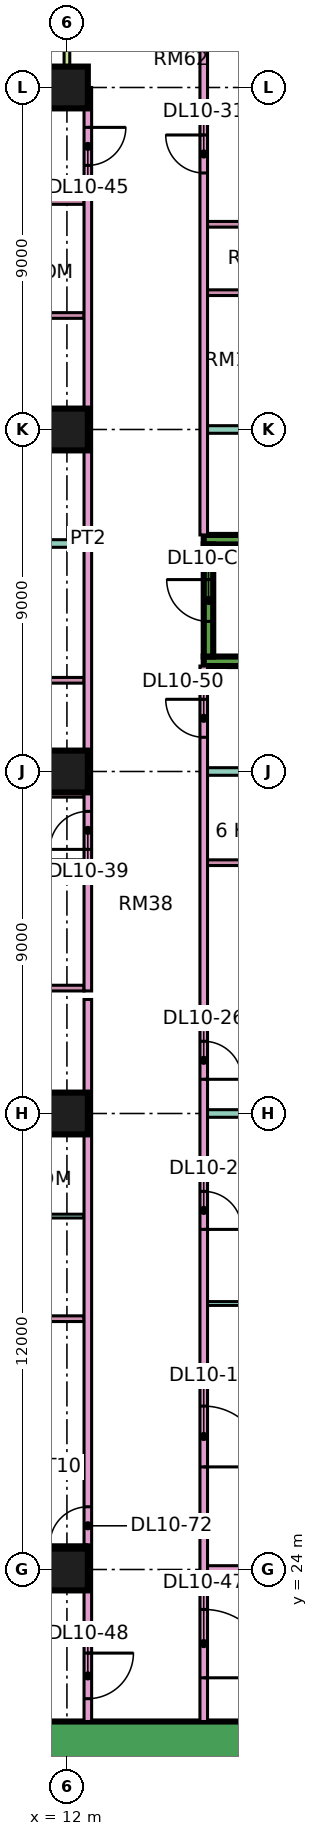
"""IFC4 building model, lengths in metres.
Left out: names, types, materials, properties, quantities, classifications, styles, units other than length and angle.
Written with IfcOpenShell. Run it as: python <this file> out.ifc"""

import sys

from ifc_helpers import new_model, si_unit, direction, frame, frame_2d, origin, origin_2d, place, context, subcontext, project, spatial, rectangle, extrude, element, fill, save


model = new_model("IFC4")
c1 = context("Model", 3, precision=1e-05, world=origin(), true_north=direction((0.0, 1.0)))
c2 = subcontext(c1, "Body", "Model", "MODEL_VIEW")
j1 = project(units=[si_unit("LENGTHUNIT", "METRE"), si_unit("PLANEANGLEUNIT", "RADIAN")], contexts=[c1])
p1 = place(None, origin())
s1 = spatial("IfcSite", under=j1, at=p1, CompositionType="ELEMENT")
p2 = place(p1, origin())
s2 = spatial("IfcBuilding", under=s1, at=p2, CompositionType="ELEMENT")
p3 = place(p2, frame((0.0, 0.0, 52.65)))
s3 = spatial("IfcBuildingStorey", under=s2, at=p3, CompositionType="ELEMENT", Elevation=52.65)
for number, where, z_axis, x_axis in (
    (1, (12.0, 24.0, 0.0), (0.0, 0.0, 1.0), (1.0, 0.0, 0.0)),
    (2, (12.0, 36.0, 0.0), (0.0, 0.0, 1.0), (1.0, 0.0, 0.0)),
    (3, (12.0, 45.0, 0.0), (0.0, 0.0, 1.0), (1.0, 0.0, 0.0)),
    (4, (12.0, 54.0, 0.0), (0.0, 0.0, 1.0), (1.0, 0.0, 0.0)),
    (5, (12.0, 63.0, 0.0), (0.0, 0.0, 1.0), (1.0, 0.0, 0.0)),
):
    element("IfcColumn", number, at=place(p3, frame(where, z_axis=z_axis, x_axis=x_axis)), inside=s3, PredefinedType="COLUMN", context=c2, shape_type="SweptSolid", body=[
        extrude(rectangle(XDim=1.1, YDim=1.1, at=origin_2d()), origin(), (0.0, 0.0, 1.0), 3.75),
    ])
p4 = place(p3, frame((9.0, 19.45, 0.0), z_axis=(0.0, 0.0, 1.0), x_axis=(1.0, 0.0, 0.0)))
e6 = element("IfcWall", 6, at=p4, inside=s3, PredefinedType="SHEAR", context=c2, shape_type="SweptSolid", body=[
    extrude(rectangle(XDim=25.0, YDim=1.1, at=frame_2d((12.5, 0.0))), origin(), (0.0, 0.0, 1.0), 3.75),
])
p5 = place(p4, frame((19.1, 0.0, 0.0)))
e7 = element("IfcOpeningElement", 7, at=p5, cuts=e6, PredefinedType="OPENING", context=c2, shape_type="SweptSolid", body=[
    extrude(rectangle(XDim=1.8, YDim=2.4, at=frame_2d((0.9, 1.2))), frame((0.0, 0.56, 0.0), z_axis=(0.0, -1.0, 0.0), x_axis=(1.0, 0.0, 0.0)), (0.0, 0.0, 1.0), 1.12),
])
for number, where, z_axis, x_axis in (
    (8, (15.6, 47.9, 0.0), (0.0, 0.0, 1.0), (1.0, 0.0, 0.0)),
    (9, (15.6, 51.1, 0.0), (0.0, 0.0, 1.0), (1.0, 0.0, 0.0)),
):
    element("IfcWall", number, at=place(p3, frame(where, z_axis=z_axis, x_axis=x_axis)), inside=s3, PredefinedType="SHEAR", context=c2, shape_type="SweptSolid", body=[
        extrude(rectangle(XDim=7.0, YDim=0.25, at=frame_2d((3.5, 0.0))), origin(), (0.0, 0.0, 1.0), 3.75),
    ])
p6 = place(p3, frame((15.725, 48.025, 0.0), z_axis=(0.0, 0.0, 1.0), x_axis=(0.0, 1.0, 0.0)))
e10 = element("IfcWall", 10, at=p6, inside=s3, PredefinedType="SHEAR", context=c2, shape_type="SweptSolid", body=[
    extrude(rectangle(XDim=2.95, YDim=0.25, at=frame_2d((1.475, 0.0))), origin(), (0.0, 0.0, 1.0), 3.75),
])
p7 = place(p6, frame((0.925, 0.0, 0.0)))
e11 = element("IfcOpeningElement", 11, at=p7, cuts=e10, PredefinedType="OPENING", context=c2, shape_type="SweptSolid", body=[
    extrude(rectangle(XDim=1.1, YDim=2.2, at=frame_2d((0.55, 1.1))), frame((0.0, 0.135, 0.0), z_axis=(0.0, -1.0, 0.0), x_axis=(1.0, 0.0, 0.0)), (0.0, 0.0, 1.0), 0.27),
])
p8 = place(p3, frame((11.925, 63.0, 0.0), z_axis=(0.0, 0.0, 1.0), x_axis=(-1.0, 0.0, 0.0)))
e12 = element("IfcWall", 12, at=p8, inside=s3, PredefinedType="SOLIDWALL", context=c2, shape_type="SweptSolid", body=[
    extrude(rectangle(XDim=10.35, YDim=0.15, at=frame_2d((5.175, 0.0))), origin(), (0.0, 0.0, 1.0), 3.35),
])
p9 = place(p8, frame((1.775, 0.0, 0.0)))
e13 = element("IfcOpeningElement", 13, at=p9, cuts=e12, PredefinedType="OPENING", context=c2, shape_type="SweptSolid", body=[
    extrude(rectangle(XDim=1.8, YDim=2.4, at=frame_2d((0.9, 1.2))), frame((0.0, 0.085, 0.0), z_axis=(0.0, -1.0, 0.0), x_axis=(1.0, 0.0, 0.0)), (0.0, 0.0, 1.0), 0.17),
])
p10 = place(p8, frame((6.062, 0.0, 0.45)))
e14 = element("IfcOpeningElement", 14, at=p10, cuts=e12, PredefinedType="OPENING", context=c2, shape_type="SweptSolid", body=[
    extrude(rectangle(XDim=3.0, YDim=2.4, at=frame_2d((1.5, 1.2))), frame((0.0, 0.085, 0.0), z_axis=(0.0, -1.0, 0.0), x_axis=(1.0, 0.0, 0.0)), (0.0, 0.0, 1.0), 0.17),
])
p11 = place(p3, frame((12.0, 64.5, 0.0), z_axis=(0.0, 0.0, 1.0), x_axis=(0.0, -1.0, 0.0)))
e15 = element("IfcWall", 15, at=p11, inside=s3, PredefinedType="SOLIDWALL", context=c2, shape_type="SweptSolid", body=[
    extrude(rectangle(XDim=1.5, YDim=0.15, at=frame_2d((0.75, 0.0))), origin(), (0.0, 0.0, 1.0), 3.35),
])
p12 = place(p3, frame((-1.35, 22.4, 0.0), z_axis=(0.0, 0.0, 1.0), x_axis=(1.0, 0.0, 0.0)))
e16 = element("IfcWall", 16, at=p12, inside=s3, PredefinedType="PARTITIONING", context=c2, shape_type="SweptSolid", body=[
    extrude(rectangle(XDim=13.8, YDim=0.2, at=frame_2d((6.9, 0.0))), origin(), (0.0, 0.0, 1.0), 3.35),
])
p13 = place(p3, frame((0.0, 36.0, 0.0), z_axis=(0.0, 0.0, 1.0), x_axis=(1.0, 0.0, 0.0)))
e17 = element("IfcWall", 17, at=p13, inside=s3, PredefinedType="PARTITIONING", context=c2, shape_type="SweptSolid", body=[
    extrude(rectangle(XDim=12.45, YDim=0.2, at=frame_2d((6.225, 0.0))), origin(), (0.0, 0.0, 1.0), 3.35),
])
p14 = place(p3, frame((0.074, 51.0, 0.0), z_axis=(0.0, 0.0, 1.0), x_axis=(1.0, 0.0, 0.0)))
e18 = element("IfcWall", 18, at=p14, inside=s3, PredefinedType="PARTITIONING", context=c2, shape_type="SweptSolid", body=[
    extrude(rectangle(XDim=12.376, YDim=0.2, at=frame_2d((6.188, 0.0))), origin(), (0.0, 0.0, 1.0), 3.35),
])
p15 = place(p3, frame((7.075, 39.3, 0.0), z_axis=(0.0, 0.0, 1.0), x_axis=(1.0, 0.0, 0.0)))
e19 = element("IfcWall", 19, at=p15, inside=s3, PredefinedType="PARTITIONING", context=c2, shape_type="SweptSolid", body=[
    extrude(rectangle(XDim=5.375, YDim=0.15, at=frame_2d((2.688, 0.0))), origin(), (0.0, 0.0, 1.0), 3.35),
])
p16 = place(p3, frame((7.075, 42.6, 0.0), z_axis=(0.0, 0.0, 1.0), x_axis=(1.0, 0.0, 0.0)))
e20 = element("IfcWall", 20, at=p16, inside=s3, PredefinedType="PARTITIONING", context=c2, shape_type="SweptSolid", body=[
    extrude(rectangle(XDim=5.375, YDim=0.15, at=frame_2d((2.688, 0.0))), origin(), (0.0, 0.0, 1.0), 3.35),
])
p17 = place(p16, frame((2.425, 0.0, 0.0)))
e21 = element("IfcOpeningElement", 21, at=p17, cuts=e20, PredefinedType="OPENING", context=c2, shape_type="SweptSolid", body=[
    extrude(rectangle(XDim=0.8, YDim=2.1, at=frame_2d((0.4, 1.05))), frame((0.0, 0.085, 0.0), z_axis=(0.0, -1.0, 0.0), x_axis=(1.0, 0.0, 0.0)), (0.0, 0.0, 1.0), 0.17),
])
for number, where, z_axis, x_axis in (
    (22, (7.225, 44.4, 0.0), (0.0, 0.0, 1.0), (1.0, 0.0, 0.0)),
    (23, (7.225, 47.4, 0.0), (0.0, 0.0, 1.0), (1.0, 0.0, 0.0)),
):
    element("IfcWall", number, at=place(p3, frame(where, z_axis=z_axis, x_axis=x_axis)), inside=s3, PredefinedType="PARTITIONING", context=c2, shape_type="SweptSolid", body=[
        extrude(rectangle(XDim=5.225, YDim=0.15, at=frame_2d((2.612, 0.0))), origin(), (0.0, 0.0, 1.0), 3.35),
    ])
p18 = place(p3, frame((7.825, 26.7, 0.0), z_axis=(0.0, 0.0, 1.0), x_axis=(1.0, 0.0, 0.0)))
e24 = element("IfcWall", 24, at=p18, inside=s3, PredefinedType="PARTITIONING", context=c2, shape_type="SweptSolid", body=[
    extrude(rectangle(XDim=4.625, YDim=0.15, at=frame_2d((2.312, 0.0))), origin(), (0.0, 0.0, 1.0), 3.35),
])
p19 = place(p18, frame((1.975, 0.0, 0.0)))
e25 = element("IfcOpeningElement", 25, at=p19, cuts=e24, PredefinedType="OPENING", context=c2, shape_type="SweptSolid", body=[
    extrude(rectangle(XDim=0.8, YDim=2.1, at=frame_2d((0.4, 1.05))), frame((0.0, 0.085, 0.0), z_axis=(0.0, -1.0, 0.0), x_axis=(1.0, 0.0, 0.0)), (0.0, 0.0, 1.0), 0.17),
])
p20 = place(p3, frame((7.825, 30.6, 0.0), z_axis=(0.0, 0.0, 1.0), x_axis=(1.0, 0.0, 0.0)))
e26 = element("IfcWall", 26, at=p20, inside=s3, PredefinedType="PARTITIONING", context=c2, shape_type="SweptSolid", body=[
    extrude(rectangle(XDim=4.625, YDim=0.15, at=frame_2d((2.312, 0.0))), origin(), (0.0, 0.0, 1.0), 3.35),
])
p21 = place(p3, frame((7.825, 33.3, 0.0), z_axis=(0.0, 0.0, 1.0), x_axis=(1.0, 0.0, 0.0)))
e27 = element("IfcWall", 27, at=p21, inside=s3, PredefinedType="PARTITIONING", context=c2, shape_type="SweptSolid", body=[
    extrude(rectangle(XDim=4.625, YDim=0.1, at=frame_2d((2.312, 0.0))), origin(), (0.0, 0.0, 1.0), 3.35),
])
for number, where, z_axis, x_axis in (
    (28, (8.425, 57.0, 0.0), (0.0, 0.0, 1.0), (1.0, 0.0, 0.0)),
    (29, (8.425, 60.0, 0.0), (0.0, 0.0, 1.0), (1.0, 0.0, 0.0)),
):
    element("IfcWall", number, at=place(p3, frame(where, z_axis=z_axis, x_axis=x_axis)), inside=s3, PredefinedType="PARTITIONING", context=c2, shape_type="SweptSolid", body=[
        extrude(rectangle(XDim=4.025, YDim=0.15, at=frame_2d((2.012, 0.0))), origin(), (0.0, 0.0, 1.0), 3.35),
    ])
p22 = place(p3, frame((12.55, 20.0, 0.0), z_axis=(0.0, 0.0, 1.0), x_axis=(0.0, 1.0, 0.0)))
e30 = element("IfcWall", 30, at=p22, inside=s3, PredefinedType="PARTITIONING", context=c2, shape_type="SweptSolid", body=[
    extrude(rectangle(XDim=19.0, YDim=0.2, at=frame_2d((9.5, 0.0))), origin(), (0.0, 0.0, 1.0), 3.35),
])
p23 = place(p22, frame((0.6, 0.0, 0.0)))
e31 = element("IfcOpeningElement", 31, at=p23, cuts=e30, PredefinedType="OPENING", context=c2, shape_type="SweptSolid", body=[
    extrude(rectangle(XDim=1.2, YDim=2.1, at=frame_2d((0.6, 1.05))), frame((0.0, 0.11, 0.0), z_axis=(0.0, -1.0, 0.0), x_axis=(1.0, 0.0, 0.0)), (0.0, 0.0, 1.0), 0.22),
])
p24 = place(p22, frame((4.65, 0.0, 0.0)))
e32 = element("IfcOpeningElement", 32, at=p24, cuts=e30, PredefinedType="OPENING", context=c2, shape_type="SweptSolid", body=[
    extrude(rectangle(XDim=1.0, YDim=2.1, at=frame_2d((0.5, 1.05))), frame((0.0, 0.11, 0.0), z_axis=(0.0, -1.0, 0.0), x_axis=(1.0, 0.0, 0.0)), (0.0, 0.0, 1.0), 0.22),
])
p25 = place(p3, frame((12.55, 39.225, 0.0), z_axis=(0.0, 0.0, 1.0), x_axis=(0.0, 1.0, 0.0)))
e33 = element("IfcWall", 33, at=p25, inside=s3, PredefinedType="PARTITIONING", context=c2, shape_type="SweptSolid", body=[
    extrude(rectangle(XDim=23.775, YDim=0.2, at=frame_2d((11.887, 0.0))), origin(), (0.0, 0.0, 1.0), 3.35),
])
p26 = place(p25, frame((3.725, 0.0, 0.0)))
e34 = element("IfcOpeningElement", 34, at=p26, cuts=e33, PredefinedType="OPENING", context=c2, shape_type="SweptSolid", body=[
    extrude(rectangle(XDim=1.0, YDim=2.1, at=frame_2d((0.5, 1.05))), frame((0.0, 0.11, 0.0), z_axis=(0.0, -1.0, 0.0), x_axis=(1.0, 0.0, 0.0)), (0.0, 0.0, 1.0), 0.22),
])
p27 = place(p25, frame((21.725, 0.0, 0.0)))
e35 = element("IfcOpeningElement", 35, at=p27, cuts=e33, PredefinedType="OPENING", context=c2, shape_type="SweptSolid", body=[
    extrude(rectangle(XDim=1.0, YDim=2.1, at=frame_2d((0.5, 1.05))), frame((0.0, 0.11, 0.0), z_axis=(0.0, -1.0, 0.0), x_axis=(1.0, 0.0, 0.0)), (0.0, 0.0, 1.0), 0.22),
])
p28 = place(p3, frame((15.6, 20.0, 0.0), z_axis=(0.0, 0.0, 1.0), x_axis=(0.0, 1.0, 0.0)))
e36 = element("IfcWall", 36, at=p28, inside=s3, PredefinedType="PARTITIONING", context=c2, shape_type="SweptSolid", body=[
    extrude(rectangle(XDim=27.775, YDim=0.2, at=frame_2d((13.887, 0.0))), origin(), (0.0, 0.0, 1.0), 3.35),
])
p29 = place(p28, frame((6.7, 0.0, 0.0)))
e37 = element("IfcOpeningElement", 37, at=p29, cuts=e36, PredefinedType="OPENING", context=c2, shape_type="SweptSolid", body=[
    extrude(rectangle(XDim=1.6, YDim=2.1, at=frame_2d((0.8, 1.05))), frame((0.0, 0.11, 0.0), z_axis=(0.0, -1.0, 0.0), x_axis=(1.0, 0.0, 0.0)), (0.0, 0.0, 1.0), 0.22),
])
p30 = place(p28, frame((12.95, 0.0, 0.0)))
e38 = element("IfcOpeningElement", 38, at=p30, cuts=e36, PredefinedType="OPENING", context=c2, shape_type="SweptSolid", body=[
    extrude(rectangle(XDim=1.0, YDim=2.1, at=frame_2d((0.5, 1.05))), frame((0.0, 0.11, 0.0), z_axis=(0.0, -1.0, 0.0), x_axis=(1.0, 0.0, 0.0)), (0.0, 0.0, 1.0), 0.22),
])
p31 = place(p28, frame((16.9, 0.0, 0.0)))
e39 = element("IfcOpeningElement", 39, at=p31, cuts=e36, PredefinedType="OPENING", context=c2, shape_type="SweptSolid", body=[
    extrude(rectangle(XDim=1.0, YDim=2.1, at=frame_2d((0.5, 1.05))), frame((0.0, 0.11, 0.0), z_axis=(0.0, -1.0, 0.0), x_axis=(1.0, 0.0, 0.0)), (0.0, 0.0, 1.0), 0.22),
])
p32 = place(p28, frame((1.15, 0.0, 0.0)))
e40 = element("IfcOpeningElement", 40, at=p32, cuts=e36, PredefinedType="OPENING", context=c2, shape_type="SweptSolid", body=[
    extrude(rectangle(XDim=1.8, YDim=2.1, at=frame_2d((0.9, 1.05))), frame((0.0, 0.11, 0.0), z_axis=(0.0, -1.0, 0.0), x_axis=(1.0, 0.0, 0.0)), (0.0, 0.0, 1.0), 0.22),
])
p33 = place(p28, frame((25.9, 0.0, 0.0)))
e41 = element("IfcOpeningElement", 41, at=p33, cuts=e36, PredefinedType="OPENING", context=c2, shape_type="SweptSolid", body=[
    extrude(rectangle(XDim=1.0, YDim=2.1, at=frame_2d((0.5, 1.05))), frame((0.0, 0.11, 0.0), z_axis=(0.0, -1.0, 0.0), x_axis=(1.0, 0.0, 0.0)), (0.0, 0.0, 1.0), 0.22),
])
p34 = place(p3, frame((15.6, 51.225, 0.0), z_axis=(0.0, 0.0, 1.0), x_axis=(0.0, 1.0, 0.0)))
e42 = element("IfcWall", 42, at=p34, inside=s3, PredefinedType="PARTITIONING", context=c2, shape_type="SweptSolid", body=[
    extrude(rectangle(XDim=13.125, YDim=0.2, at=frame_2d((6.562, 0.0))), origin(), (0.0, 0.0, 1.0), 3.35),
])
p35 = place(p34, frame((9.525, 0.0, 0.0)))
e43 = element("IfcOpeningElement", 43, at=p35, cuts=e42, PredefinedType="OPENING", context=c2, shape_type="SweptSolid", body=[
    extrude(rectangle(XDim=1.0, YDim=2.1, at=frame_2d((0.5, 1.05))), frame((0.0, 0.11, 0.0), z_axis=(0.0, -1.0, 0.0), x_axis=(1.0, 0.0, 0.0)), (0.0, 0.0, 1.0), 0.22),
])
p36 = place(p3, frame((15.7, 24.0, 0.0), z_axis=(0.0, 0.0, 1.0), x_axis=(1.0, 0.0, 0.0)))
e44 = element("IfcWall", 44, at=p36, inside=s3, PredefinedType="PARTITIONING", context=c2, shape_type="SweptSolid", body=[
    extrude(rectangle(XDim=5.8, YDim=0.2, at=frame_2d((2.9, 0.0))), origin(), (0.0, 0.0, 1.0), 3.35),
])
p37 = place(p3, frame((15.7, 31.0, 0.0), z_axis=(0.0, 0.0, 1.0), x_axis=(1.0, 0.0, 0.0)))
e45 = element("IfcWall", 45, at=p37, inside=s3, PredefinedType="PARTITIONING", context=c2, shape_type="SweptSolid", body=[
    extrude(rectangle(XDim=5.8, YDim=0.1, at=frame_2d((2.9, 0.0))), origin(), (0.0, 0.0, 1.0), 3.35),
])
p38 = place(p3, frame((15.7, 36.0, 0.0), z_axis=(0.0, 0.0, 1.0), x_axis=(1.0, 0.0, 0.0)))
e46 = element("IfcWall", 46, at=p38, inside=s3, PredefinedType="PARTITIONING", context=c2, shape_type="SweptSolid", body=[
    extrude(rectangle(XDim=8.3, YDim=0.2, at=frame_2d((4.15, 0.0))), origin(), (0.0, 0.0, 1.0), 3.35),
])
for number, where, z_axis, x_axis in (
    (47, (15.7, 38.7, 0.0), (0.0, 0.0, 1.0), (1.0, 0.0, 0.0)),
    (48, (15.7, 42.6, 0.0), (0.0, 0.0, 1.0), (1.0, 0.0, 0.0)),
):
    element("IfcWall", number, at=place(p3, frame(where, z_axis=z_axis, x_axis=x_axis)), inside=s3, PredefinedType="PARTITIONING", context=c2, shape_type="SweptSolid", body=[
        extrude(rectangle(XDim=3.125, YDim=0.15, at=frame_2d((1.562, 0.0))), origin(), (0.0, 0.0, 1.0), 3.35),
    ])
p39 = place(p3, frame((15.7, 45.0, 0.0), z_axis=(0.0, 0.0, 1.0), x_axis=(1.0, 0.0, 0.0)))
e49 = element("IfcWall", 49, at=p39, inside=s3, PredefinedType="PARTITIONING", context=c2, shape_type="SweptSolid", body=[
    extrude(rectangle(XDim=8.3, YDim=0.2, at=frame_2d((4.15, 0.0))), origin(), (0.0, 0.0, 1.0), 3.35),
])
p40 = place(p3, frame((15.7, 54.0, 0.0), z_axis=(0.0, 0.0, 1.0), x_axis=(1.0, 0.0, 0.0)))
e50 = element("IfcWall", 50, at=p40, inside=s3, PredefinedType="PARTITIONING", context=c2, shape_type="SweptSolid", body=[
    extrude(rectangle(XDim=8.226, YDim=0.2, at=frame_2d((4.113, 0.0))), origin(), (0.0, 0.0, 1.0), 3.35),
])
for number, where, z_axis, x_axis in (
    (51, (15.7, 57.6, 0.0), (0.0, 0.0, 1.0), (1.0, 0.0, 0.0)),
    (52, (15.7, 59.4, 0.0), (0.0, 0.0, 1.0), (1.0, 0.0, 0.0)),
):
    element("IfcWall", number, at=place(p3, frame(where, z_axis=z_axis, x_axis=x_axis)), inside=s3, PredefinedType="PARTITIONING", context=c2, shape_type="SweptSolid", body=[
        extrude(rectangle(XDim=2.525, YDim=0.15, at=frame_2d((1.263, 0.0))), origin(), (0.0, 0.0, 1.0), 3.35),
    ])
p41 = place(p7, frame((1.1, 0.0, 0.0), z_axis=(0.0, 0.0, 1.0), x_axis=(-1.0, 0.0, 0.0)))
e53 = element("IfcDoor", 53, at=p41, inside=s3, OperationType="SINGLE_SWING_RIGHT", PredefinedType="DOOR", context=c2, shape_type="SweptSolid", body=[
    extrude(rectangle(XDim=1.1, YDim=2.2, at=frame_2d((0.55, 1.1))), frame((0.0, 0.025, 0.0), z_axis=(0.0, -1.0, 0.0), x_axis=(1.0, 0.0, 0.0)), (0.0, 0.0, 1.0), 0.05),
])
fill(e11, e53)
p42 = place(p29, frame((1.6, 0.0, 0.0), z_axis=(0.0, 0.0, 1.0), x_axis=(-1.0, 0.0, 0.0)))
e54 = element("IfcDoor", 54, at=p42, inside=s3, OperationType="DOUBLE_DOOR_SINGLE_SWING", PredefinedType="DOOR", context=c2, shape_type="SweptSolid", body=[
    extrude(rectangle(XDim=1.6, YDim=2.1, at=frame_2d((0.8, 1.05))), frame((0.0, 0.025, 0.0), z_axis=(0.0, -1.0, 0.0), x_axis=(1.0, 0.0, 0.0)), (0.0, 0.0, 1.0), 0.05),
])
fill(e37, e54)
p43 = place(p30, frame((1.0, 0.0, 0.0), z_axis=(0.0, 0.0, 1.0), x_axis=(-1.0, 0.0, 0.0)))
e55 = element("IfcDoor", 55, at=p43, inside=s3, OperationType="SINGLE_SWING_LEFT", PredefinedType="DOOR", context=c2, shape_type="SweptSolid", body=[
    extrude(rectangle(XDim=1.0, YDim=2.1, at=frame_2d((0.5, 1.05))), frame((0.0, 0.025, 0.0), z_axis=(0.0, -1.0, 0.0), x_axis=(1.0, 0.0, 0.0)), (0.0, 0.0, 1.0), 0.05),
])
fill(e38, e55)
p44 = place(p31, frame((1.0, 0.0, 0.0), z_axis=(0.0, 0.0, 1.0), x_axis=(-1.0, 0.0, 0.0)))
e56 = element("IfcDoor", 56, at=p44, inside=s3, OperationType="SINGLE_SWING_LEFT", PredefinedType="DOOR", context=c2, shape_type="SweptSolid", body=[
    extrude(rectangle(XDim=1.0, YDim=2.1, at=frame_2d((0.5, 1.05))), frame((0.0, 0.025, 0.0), z_axis=(0.0, -1.0, 0.0), x_axis=(1.0, 0.0, 0.0)), (0.0, 0.0, 1.0), 0.05),
])
fill(e39, e56)
p45 = place(p35, frame((1.0, 0.0, 0.0), z_axis=(0.0, 0.0, 1.0), x_axis=(-1.0, 0.0, 0.0)))
e57 = element("IfcDoor", 57, at=p45, inside=s3, OperationType="SINGLE_SWING_RIGHT", PredefinedType="DOOR", context=c2, shape_type="SweptSolid", body=[
    extrude(rectangle(XDim=1.0, YDim=2.1, at=frame_2d((0.5, 1.05))), frame((0.0, 0.025, 0.0), z_axis=(0.0, -1.0, 0.0), x_axis=(1.0, 0.0, 0.0)), (0.0, 0.0, 1.0), 0.05),
])
fill(e43, e57)
p46 = place(p26, origin())
e58 = element("IfcDoor", 58, at=p46, inside=s3, OperationType="SINGLE_SWING_LEFT", PredefinedType="DOOR", context=c2, shape_type="SweptSolid", body=[
    extrude(rectangle(XDim=1.0, YDim=2.1, at=frame_2d((0.5, 1.05))), frame((0.0, 0.025, 0.0), z_axis=(0.0, -1.0, 0.0), x_axis=(1.0, 0.0, 0.0)), (0.0, 0.0, 1.0), 0.05),
])
fill(e34, e58)
p47 = place(p27, origin())
e59 = element("IfcDoor", 59, at=p47, inside=s3, OperationType="SINGLE_SWING_RIGHT", PredefinedType="DOOR", context=c2, shape_type="SweptSolid", body=[
    extrude(rectangle(XDim=1.0, YDim=2.1, at=frame_2d((0.5, 1.05))), frame((0.0, 0.025, 0.0), z_axis=(0.0, -1.0, 0.0), x_axis=(1.0, 0.0, 0.0)), (0.0, 0.0, 1.0), 0.05),
])
fill(e35, e59)
p48 = place(p32, frame((1.8, 0.0, 0.0), z_axis=(0.0, 0.0, 1.0), x_axis=(-1.0, 0.0, 0.0)))
e60 = element("IfcDoor", 60, at=p48, inside=s3, OperationType="DOUBLE_DOOR_SINGLE_SWING", PredefinedType="DOOR", context=c2, shape_type="SweptSolid", body=[
    extrude(rectangle(XDim=1.8, YDim=2.1, at=frame_2d((0.9, 1.05))), frame((0.0, 0.025, 0.0), z_axis=(0.0, -1.0, 0.0), x_axis=(1.0, 0.0, 0.0)), (0.0, 0.0, 1.0), 0.05),
])
fill(e40, e60)
p49 = place(p23, origin())
e61 = element("IfcDoor", 61, at=p49, inside=s3, OperationType="SINGLE_SWING_RIGHT", PredefinedType="DOOR", context=c2, shape_type="SweptSolid", body=[
    extrude(rectangle(XDim=1.2, YDim=2.1, at=frame_2d((0.6, 1.05))), frame((0.0, 0.025, 0.0), z_axis=(0.0, -1.0, 0.0), x_axis=(1.0, 0.0, 0.0)), (0.0, 0.0, 1.0), 0.05),
])
fill(e31, e61)
p50 = place(p33, frame((1.0, 0.0, 0.0), z_axis=(0.0, 0.0, 1.0), x_axis=(-1.0, 0.0, 0.0)))
e62 = element("IfcDoor", 62, at=p50, inside=s3, OperationType="SINGLE_SWING_RIGHT", PredefinedType="DOOR", context=c2, shape_type="SweptSolid", body=[
    extrude(rectangle(XDim=1.0, YDim=2.1, at=frame_2d((0.5, 1.05))), frame((0.0, 0.025, 0.0), z_axis=(0.0, -1.0, 0.0), x_axis=(1.0, 0.0, 0.0)), (0.0, 0.0, 1.0), 0.05),
])
fill(e41, e62)
p51 = place(p24, origin())
e63 = element("IfcDoor", 63, at=p51, inside=s3, OperationType="SINGLE_SWING_LEFT", PredefinedType="DOOR", context=c2, shape_type="SweptSolid", body=[
    extrude(rectangle(XDim=1.0, YDim=2.1, at=frame_2d((0.5, 1.05))), frame((0.0, 0.025, 0.0), z_axis=(0.0, -1.0, 0.0), x_axis=(1.0, 0.0, 0.0)), (0.0, 0.0, 1.0), 0.05),
])
fill(e32, e63)
save(model, sys.argv[1])
